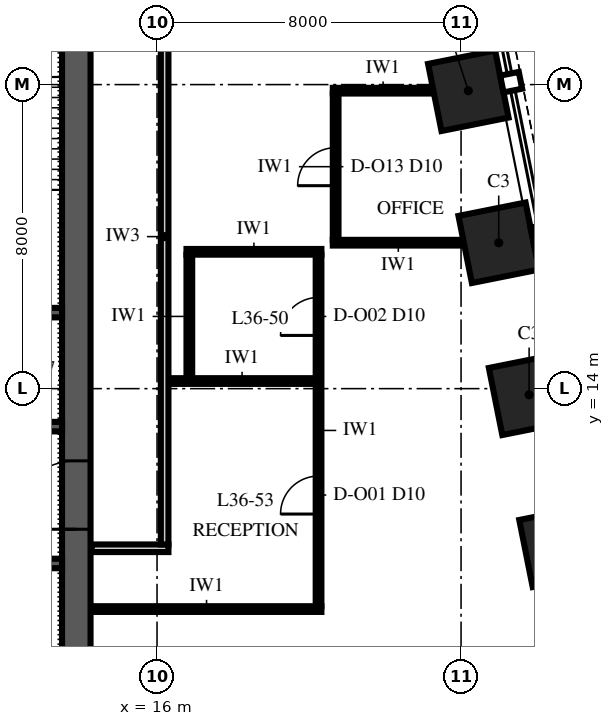
"""IFC4 building model, lengths in metres.
Left out: names, types, materials, properties, quantities, classifications, styles, units other than length and angle.
Written with IfcOpenShell. Run it as: python <this file> out.ifc"""

import sys

from ifc_helpers import new_model, si_unit, direction, frame, frame_2d, origin, origin_2d, place, context, subcontext, project, spatial, polyline, rectangle, outline, extrude, element, fill, save


model = new_model("IFC4")
c1 = context("Model", 3, precision=1e-05, world=origin(), true_north=direction((0.0, 1.0)))
c2 = subcontext(c1, "Body", "Model", "MODEL_VIEW")
j1 = project(units=[si_unit("LENGTHUNIT", "METRE"), si_unit("PLANEANGLEUNIT", "RADIAN")], contexts=[c1])
p1 = place(None, origin())
s1 = spatial("IfcSite", under=j1, at=p1, CompositionType="ELEMENT")
p2 = place(p1, origin())
s2 = spatial("IfcBuilding", under=s1, at=p2, CompositionType="ELEMENT")
p3 = place(p2, frame((0.0, 0.0, 159.0)))
s3 = spatial("IfcBuildingStorey", under=s2, at=p3, CompositionType="ELEMENT", Elevation=159.0)
for number, where, z_axis, x_axis in (
    (1, (26.591, 9.838, 0.0), (0.0, 0.0, 1.0), (-0.196, 0.981, 0.0)),
    (2, (25.791, 13.838, 0.0), (0.0, 0.0, 1.0), (-0.196, 0.981, 0.0)),
    (3, (24.991, 17.838, 0.0), (0.0, 0.0, 1.0), (-0.196, 0.981, 0.0)),
    (4, (24.191, 21.838, 0.0), (0.0, 0.0, 1.0), (-0.196, 0.981, 0.0)),
):
    element("IfcColumn", number, at=place(p3, frame(where, z_axis=z_axis, x_axis=x_axis)), inside=s3, PredefinedType="COLUMN", context=c2, shape_type="SweptSolid", body=[
        extrude(rectangle(XDim=1.8, YDim=1.8, at=origin_2d()), origin(), (0.0, 0.0, 1.0), 4.0),
    ])
p4 = place(p3, frame((13.875, 6.125, 0.0), z_axis=(0.0, 0.0, 1.0), x_axis=(0.0, 1.0, 0.0)))
e5 = element("IfcWall", 5, at=p4, inside=s3, PredefinedType="SHEAR", context=c2, shape_type="SweptSolid", body=[
    extrude(outline(polyline([(0.0, -0.375), (17.75, -0.375), (17.75, 0.0), (17.375, 0.0), (17.375, 0.375), (0.375, 0.375), (0.375, 0.0), (0.0, 0.0), (0.0, -0.375)])), origin(), (0.0, 0.0, 1.0), 4.0),
])
p5 = place(p4, frame((4.175, 0.0, 0.0)))
e6 = element("IfcOpeningElement", 6, at=p5, cuts=e5, PredefinedType="OPENING", context=c2, shape_type="SweptSolid", body=[
    extrude(rectangle(XDim=1.8, YDim=2.4, at=frame_2d((0.9, 1.2))), frame((0.0, 0.39, 0.0), z_axis=(0.0, -1.0, 0.0), x_axis=(1.0, 0.0, 0.0)), (0.0, 0.0, 1.0), 0.78),
])
p6 = place(p3, frame((-13.5, 9.4, 0.0), z_axis=(0.0, 0.0, 1.0), x_axis=(1.0, 0.0, 0.0)))
e7 = element("IfcWall", 7, at=p6, inside=s3, PredefinedType="SHEAR", context=c2, shape_type="SweptSolid", body=[
    extrude(rectangle(XDim=27.0, YDim=0.25, at=frame_2d((13.5, 0.0))), origin(), (0.0, 0.0, 1.0), 4.0),
])
p7 = place(p6, frame((0.35, 0.0, 0.0)))
e8 = element("IfcOpeningElement", 8, at=p7, cuts=e7, PredefinedType="OPENING", context=c2, shape_type="SweptSolid", body=[
    extrude(rectangle(XDim=1.1, YDim=2.1, at=frame_2d((0.55, 1.05))), frame((0.0, 0.14, 0.0), z_axis=(0.0, -1.0, 0.0), x_axis=(1.0, 0.0, 0.0)), (0.0, 0.0, 1.0), 0.28),
])
p8 = place(p6, frame((3.15, 0.0, 0.0)))
e9 = element("IfcOpeningElement", 9, at=p8, cuts=e7, PredefinedType="OPENING", context=c2, shape_type="SweptSolid", body=[
    extrude(rectangle(XDim=1.1, YDim=2.1, at=frame_2d((0.55, 1.05))), frame((0.0, 0.14, 0.0), z_axis=(0.0, -1.0, 0.0), x_axis=(1.0, 0.0, 0.0)), (0.0, 0.0, 1.0), 0.28),
])
p9 = place(p6, frame((5.95, 0.0, 0.0)))
e10 = element("IfcOpeningElement", 10, at=p9, cuts=e7, PredefinedType="OPENING", context=c2, shape_type="SweptSolid", body=[
    extrude(rectangle(XDim=1.1, YDim=2.1, at=frame_2d((0.55, 1.05))), frame((0.0, 0.14, 0.0), z_axis=(0.0, -1.0, 0.0), x_axis=(1.0, 0.0, 0.0)), (0.0, 0.0, 1.0), 0.28),
])
p10 = place(p3, frame((-13.5, 13.0, 0.0), z_axis=(0.0, 0.0, 1.0), x_axis=(1.0, 0.0, 0.0)))
e11 = element("IfcWall", 11, at=p10, inside=s3, PredefinedType="SHEAR", context=c2, shape_type="SweptSolid", body=[
    extrude(rectangle(XDim=27.0, YDim=0.25, at=frame_2d((13.5, 0.0))), origin(), (0.0, 0.0, 1.0), 4.0),
])
p11 = place(p10, frame((0.35, 0.0, 0.0)))
e12 = element("IfcOpeningElement", 12, at=p11, cuts=e11, PredefinedType="OPENING", context=c2, shape_type="SweptSolid", body=[
    extrude(rectangle(XDim=1.1, YDim=2.1, at=frame_2d((0.55, 1.05))), frame((0.0, 0.14, 0.0), z_axis=(0.0, -1.0, 0.0), x_axis=(1.0, 0.0, 0.0)), (0.0, 0.0, 1.0), 0.28),
])
p12 = place(p10, frame((3.15, 0.0, 0.0)))
e13 = element("IfcOpeningElement", 13, at=p12, cuts=e11, PredefinedType="OPENING", context=c2, shape_type="SweptSolid", body=[
    extrude(rectangle(XDim=1.1, YDim=2.1, at=frame_2d((0.55, 1.05))), frame((0.0, 0.14, 0.0), z_axis=(0.0, -1.0, 0.0), x_axis=(1.0, 0.0, 0.0)), (0.0, 0.0, 1.0), 0.28),
])
p13 = place(p10, frame((5.95, 0.0, 0.0)))
e14 = element("IfcOpeningElement", 14, at=p13, cuts=e11, PredefinedType="OPENING", context=c2, shape_type="SweptSolid", body=[
    extrude(rectangle(XDim=1.1, YDim=2.1, at=frame_2d((0.55, 1.05))), frame((0.0, 0.14, 0.0), z_axis=(0.0, -1.0, 0.0), x_axis=(1.0, 0.0, 0.0)), (0.0, 0.0, 1.0), 0.28),
])
p14 = place(p10, frame((15.25, 0.0, 0.0)))
e15 = element("IfcOpeningElement", 15, at=p14, cuts=e11, PredefinedType="OPENING", context=c2, shape_type="SweptSolid", body=[
    extrude(rectangle(XDim=0.9, YDim=2.1, at=frame_2d((0.45, 1.05))), frame((0.0, 0.14, 0.0), z_axis=(0.0, -1.0, 0.0), x_axis=(1.0, 0.0, 0.0)), (0.0, 0.0, 1.0), 0.28),
])
p15 = place(p10, frame((17.65, 0.0, 0.0)))
e16 = element("IfcOpeningElement", 16, at=p15, cuts=e11, PredefinedType="OPENING", context=c2, shape_type="SweptSolid", body=[
    extrude(rectangle(XDim=0.9, YDim=2.1, at=frame_2d((0.45, 1.05))), frame((0.0, 0.14, 0.0), z_axis=(0.0, -1.0, 0.0), x_axis=(1.0, 0.0, 0.0)), (0.0, 0.0, 1.0), 0.28),
])
p16 = place(p10, frame((21.05, 0.0, 0.0)))
e17 = element("IfcOpeningElement", 17, at=p16, cuts=e11, PredefinedType="OPENING", context=c2, shape_type="SweptSolid", body=[
    extrude(rectangle(XDim=0.9, YDim=2.1, at=frame_2d((0.45, 1.05))), frame((0.0, 0.14, 0.0), z_axis=(0.0, -1.0, 0.0), x_axis=(1.0, 0.0, 0.0)), (0.0, 0.0, 1.0), 0.28),
])
p17 = place(p3, frame((-13.5, 16.0, 0.0), z_axis=(0.0, 0.0, 1.0), x_axis=(1.0, 0.0, 0.0)))
e18 = element("IfcWall", 18, at=p17, inside=s3, PredefinedType="SHEAR", context=c2, shape_type="SweptSolid", body=[
    extrude(rectangle(XDim=27.0, YDim=0.25, at=frame_2d((13.5, 0.0))), origin(), (0.0, 0.0, 1.0), 4.0),
])
p18 = place(p3, frame((14.28, 8.2, 0.0), z_axis=(0.0, 0.0, 1.0), x_axis=(1.0, 0.0, 0.0)))
e19 = element("IfcWall", 19, at=p18, inside=s3, PredefinedType="PARTITIONING", context=c2, shape_type="SweptSolid", body=[
    extrude(rectangle(XDim=6.045, YDim=0.15, at=frame_2d((3.022, 0.0))), origin(), (0.0, 0.0, 1.0), 3.85),
])
p19 = place(p3, frame((14.28, 9.8, 0.0), z_axis=(0.0, 0.0, 1.0), x_axis=(1.0, 0.0, 0.0)))
e20 = element("IfcWall", 20, at=p19, inside=s3, PredefinedType="PARTITIONING", context=c2, shape_type="SweptSolid", body=[
    extrude(rectangle(XDim=2.02, YDim=0.2, at=frame_2d((1.01, 0.0))), origin(), (0.0, 0.0, 1.0), 3.85),
])
p20 = place(p3, frame((16.3, 14.2, 0.0), z_axis=(0.0, 0.0, 1.0), x_axis=(1.0, 0.0, 0.0)))
e21 = element("IfcWall", 21, at=p20, inside=s3, PredefinedType="PARTITIONING", context=c2, shape_type="SweptSolid", body=[
    extrude(rectangle(XDim=3.875, YDim=0.15, at=frame_2d((1.938, 0.0))), origin(), (0.0, 0.0, 1.0), 3.25),
])
p21 = place(p3, frame((16.775, 17.6, 0.0), z_axis=(0.0, 0.0, 1.0), x_axis=(1.0, 0.0, 0.0)))
e22 = element("IfcWall", 22, at=p21, inside=s3, PredefinedType="PARTITIONING", context=c2, shape_type="SweptSolid", body=[
    extrude(rectangle(XDim=3.55, YDim=0.15, at=frame_2d((1.775, 0.0))), origin(), (0.0, 0.0, 1.0), 3.85),
])
p22 = place(p3, frame((20.625, 17.84, 0.0), z_axis=(0.0, 0.0, 1.0), x_axis=(1.0, 0.0, 0.0)))
e23 = element("IfcWall", 23, at=p22, inside=s3, PredefinedType="PARTITIONING", context=c2, shape_type="SweptSolid", body=[
    extrude(rectangle(XDim=3.448, YDim=0.15, at=frame_2d((1.724, 0.0))), origin(), (0.0, 0.0, 1.0), 3.25),
])
p23 = place(p3, frame((20.625, 21.84, 0.0), z_axis=(0.0, 0.0, 1.0), x_axis=(1.0, 0.0, 0.0)))
e24 = element("IfcWall", 24, at=p23, inside=s3, PredefinedType="PARTITIONING", context=c2, shape_type="SweptSolid", body=[
    extrude(rectangle(XDim=2.648, YDim=0.15, at=frame_2d((1.324, 0.0))), origin(), (0.0, 0.0, 1.0), 3.25),
])
p24 = place(p3, frame((16.2, 9.9, 0.0), z_axis=(0.0, 0.0, 1.0), x_axis=(0.0, 1.0, 0.0)))
e25 = element("IfcWall", 25, at=p24, inside=s3, PredefinedType="PARTITIONING", context=c2, shape_type="SweptSolid", body=[
    extrude(rectangle(XDim=16.2, YDim=0.2, at=frame_2d((8.1, 0.0))), origin(), (0.0, 0.0, 1.0), 3.25),
])
p25 = place(p24, frame((14.7, 0.0, 0.0)))
e26 = element("IfcOpeningElement", 26, at=p25, cuts=e25, PredefinedType="OPENING", context=c2, shape_type="SweptSolid", body=[
    extrude(rectangle(XDim=1.2, YDim=2.4, at=frame_2d((0.6, 1.2))), frame((0.0, 0.115, 0.0), z_axis=(0.0, -1.0, 0.0), x_axis=(1.0, 0.0, 0.0)), (0.0, 0.0, 1.0), 0.23),
])
p26 = place(p3, frame((16.85, 14.275, 0.0), z_axis=(0.0, 0.0, 1.0), x_axis=(0.0, 1.0, 0.0)))
e27 = element("IfcWall", 27, at=p26, inside=s3, PredefinedType="PARTITIONING", context=c2, shape_type="SweptSolid", body=[
    extrude(rectangle(XDim=3.25, YDim=0.15, at=frame_2d((1.625, 0.0))), origin(), (0.0, 0.0, 1.0), 3.25),
])
p27 = place(p3, frame((20.25, 8.275, 0.0), z_axis=(0.0, 0.0, 1.0), x_axis=(0.0, 1.0, 0.0)))
e28 = element("IfcWall", 28, at=p27, inside=s3, PredefinedType="PARTITIONING", context=c2, shape_type="SweptSolid", body=[
    extrude(rectangle(XDim=9.25, YDim=0.15, at=frame_2d((4.625, 0.0))), origin(), (0.0, 0.0, 1.0), 3.25),
])
p28 = place(p27, frame((2.425, 0.0, 0.0)))
e29 = element("IfcOpeningElement", 29, at=p28, cuts=e28, PredefinedType="OPENING", context=c2, shape_type="SweptSolid", body=[
    extrude(rectangle(XDim=1.0, YDim=2.3, at=frame_2d((0.5, 1.15))), frame((0.0, 0.09, 0.0), z_axis=(0.0, -1.0, 0.0), x_axis=(1.0, 0.0, 0.0)), (0.0, 0.0, 1.0), 0.18),
])
p29 = place(p27, frame((7.125, 0.0, 0.0)))
e30 = element("IfcOpeningElement", 30, at=p29, cuts=e28, PredefinedType="OPENING", context=c2, shape_type="SweptSolid", body=[
    extrude(rectangle(XDim=1.0, YDim=2.3, at=frame_2d((0.5, 1.15))), frame((0.0, 0.09, 0.0), z_axis=(0.0, -1.0, 0.0), x_axis=(1.0, 0.0, 0.0)), (0.0, 0.0, 1.0), 0.18),
])
p30 = place(p3, frame((20.7, 17.915, 0.0), z_axis=(0.0, 0.0, 1.0), x_axis=(0.0, 1.0, 0.0)))
e31 = element("IfcWall", 31, at=p30, inside=s3, PredefinedType="PARTITIONING", context=c2, shape_type="SweptSolid", body=[
    extrude(rectangle(XDim=3.85, YDim=0.15, at=frame_2d((1.925, 0.0))), origin(), (0.0, 0.0, 1.0), 3.25),
])
p31 = place(p30, frame((1.425, 0.0, 0.0)))
e32 = element("IfcOpeningElement", 32, at=p31, cuts=e31, PredefinedType="OPENING", context=c2, shape_type="SweptSolid", body=[
    extrude(rectangle(XDim=1.0, YDim=2.3, at=frame_2d((0.5, 1.15))), frame((0.0, 0.09, 0.0), z_axis=(0.0, -1.0, 0.0), x_axis=(1.0, 0.0, 0.0)), (0.0, 0.0, 1.0), 0.18),
])
p32 = place(p5, origin())
e33 = element("IfcDoor", 33, at=p32, inside=s3, OperationType="DOUBLE_DOOR_SINGLE_SWING", PredefinedType="DOOR", context=c2, shape_type="SweptSolid", body=[
    extrude(rectangle(XDim=1.8, YDim=2.4, at=frame_2d((0.9, 1.2))), frame((0.0, 0.375, 0.0), z_axis=(0.0, -1.0, 0.0), x_axis=(1.0, 0.0, 0.0)), (0.0, 0.0, 1.0), 0.75),
])
fill(e6, e33)
p33 = place(p28, origin())
e34 = element("IfcDoor", 34, at=p33, inside=s3, OperationType="SINGLE_SWING_LEFT", PredefinedType="DOOR", context=c2, shape_type="SweptSolid", body=[
    extrude(rectangle(XDim=1.0, YDim=2.3, at=frame_2d((0.5, 1.15))), frame((0.0, 0.075, 0.0), z_axis=(0.0, -1.0, 0.0), x_axis=(1.0, 0.0, 0.0)), (0.0, 0.0, 1.0), 0.149),
])
fill(e29, e34)
p34 = place(p29, origin())
e35 = element("IfcDoor", 35, at=p34, inside=s3, OperationType="SINGLE_SWING_LEFT", PredefinedType="DOOR", context=c2, shape_type="SweptSolid", body=[
    extrude(rectangle(XDim=1.0, YDim=2.3, at=frame_2d((0.5, 1.15))), frame((0.0, 0.075, 0.0), z_axis=(0.0, -1.0, 0.0), x_axis=(1.0, 0.0, 0.0)), (0.0, 0.0, 1.0), 0.149),
])
fill(e30, e35)
p35 = place(p31, origin())
e36 = element("IfcDoor", 36, at=p35, inside=s3, OperationType="SINGLE_SWING_LEFT", PredefinedType="DOOR", context=c2, shape_type="SweptSolid", body=[
    extrude(rectangle(XDim=1.0, YDim=2.3, at=frame_2d((0.5, 1.15))), frame((0.0, 0.075, 0.0), z_axis=(0.0, -1.0, 0.0), x_axis=(1.0, 0.0, 0.0)), (0.0, 0.0, 1.0), 0.149),
])
fill(e32, e36)
save(model, sys.argv[1])
